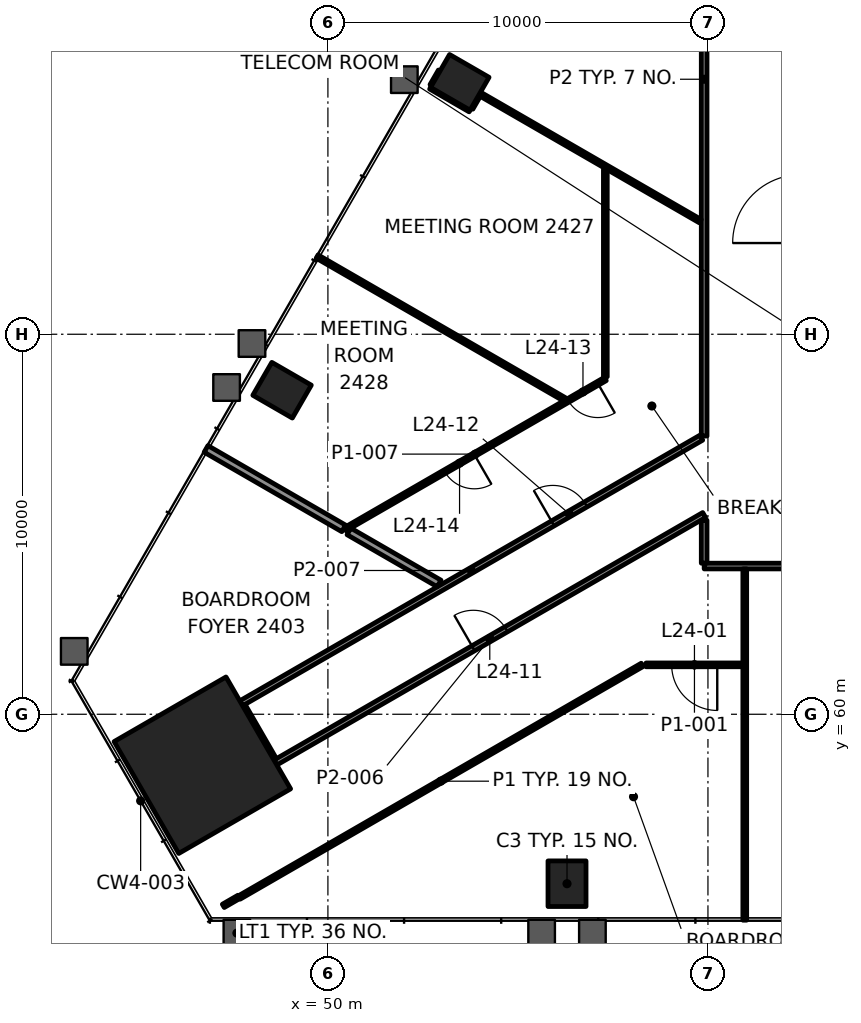
"""IFC4 building model, lengths in metres.
Left out: names, types, materials, properties, quantities, classifications, styles, units other than length and angle.
Written with IfcOpenShell. Run it as: python <this file> out.ifc"""

import sys

from ifc_helpers import new_model, si_unit, direction, frame, frame_2d, origin, origin_2d, place, context, subcontext, project, spatial, rectangle, extrude, element, fill, save


model = new_model("IFC4")
c1 = context("Model", 3, precision=1e-05, world=origin(), true_north=direction((0.0, 1.0)))
c2 = subcontext(c1, "Body", "Model", "MODEL_VIEW")
j1 = project(units=[si_unit("LENGTHUNIT", "METRE"), si_unit("PLANEANGLEUNIT", "RADIAN")], contexts=[c1])
p1 = place(None, origin())
s1 = spatial("IfcSite", under=j1, at=p1, CompositionType="ELEMENT")
p2 = place(p1, origin())
s2 = spatial("IfcBuilding", under=s1, at=p2, CompositionType="ELEMENT")
p3 = place(p2, frame((0.0, 0.0, 107.2)))
s3 = spatial("IfcBuildingStorey", under=s2, at=p3, CompositionType="ELEMENT", Elevation=107.2)
p4 = place(p3, frame((46.696, 58.659, 0.0), z_axis=(0.0, 0.0, 1.0), x_axis=(0.5, -0.866025403784, 0.0)))
e1 = element("IfcColumn", 1, at=p4, inside=s3, PredefinedType="COLUMN", context=c2, shape_type="SweptSolid", body=[
    extrude(rectangle(XDim=3.4, YDim=3.4, at=origin_2d()), origin(), (0.0, 0.0, 1.0), 4.2),
])
for number, where, z_axis, x_axis in (
    (2, (56.292, 55.541, -0.0), (0.0, 0.0, 1.0), (1.0, 0.0, 0.0)),
    (3, (53.471, 76.628, -0.0), (0.0, 0.0, 1.0), (-0.5, -0.866, 0.0)),
    (4, (48.794, 68.528, -0.0), (0.0, 0.0, 1.0), (-0.5, -0.866, 0.0)),
):
    element("IfcColumn", number, at=place(p3, frame(where, z_axis=z_axis, x_axis=x_axis)), inside=s3, PredefinedType="COLUMN", context=c2, shape_type="SweptSolid", body=[
        extrude(rectangle(XDim=1.0, YDim=1.2, at=origin_2d()), origin(), (0.0, 0.0, 1.0), 4.2),
    ])
p5 = place(p3, frame((60.919, 61.3, 0.0), z_axis=(0.0, 0.0, 1.0), x_axis=(-1.0, 0.0, 0.0)))
e5 = element("IfcWall", 5, at=p5, inside=s3, PredefinedType="PARTITIONING", context=c2, shape_type="SweptSolid", body=[
    extrude(rectangle(XDim=2.548, YDim=0.1, at=frame_2d((1.274, 0.0))), origin(), (0.0, 0.0, 1.0), 3.4),
])
p6 = place(p5, frame((0.674, 0.0, 0.0)))
e6 = element("IfcOpeningElement", 6, at=p6, cuts=e5, PredefinedType="OPENING", context=c2, shape_type="SweptSolid", body=[
    extrude(rectangle(XDim=1.2, YDim=2.1, at=frame_2d((0.6, 1.05))), frame((0.0, 0.06, 0.0), z_axis=(0.0, -1.0, 0.0), x_axis=(1.0, 0.0, 0.0)), (0.0, 0.0, 1.0), 0.12),
])
p7 = place(p3, frame((90.099, 63.9, 0.0), z_axis=(0.0, 0.0, 1.0), x_axis=(-1.0, 0.0, 0.0)))
e7 = element("IfcWall", 7, at=p7, inside=s3, PredefinedType="PARTITIONING", context=c2, shape_type="SweptSolid", body=[
    extrude(rectangle(XDim=30.199, YDim=0.15, at=frame_2d((15.099, 0.0))), origin(), (0.0, 0.0, 1.0), 3.4),
])
p8 = place(p7, frame((5.882, 0.0, 0.0)))
e8 = element("IfcOpeningElement", 8, at=p8, cuts=e7, PredefinedType="OPENING", context=c2, shape_type="SweptSolid", body=[
    extrude(rectangle(XDim=1.2, YDim=2.1, at=frame_2d((0.6, 1.05))), frame((0.0, 0.085, 0.0), z_axis=(0.0, -1.0, 0.0), x_axis=(1.0, 0.0, 0.0)), (0.0, 0.0, 1.0), 0.17),
])
p9 = place(p7, frame((20.346, 0.0, 0.0)))
e9 = element("IfcOpeningElement", 9, at=p9, cuts=e7, PredefinedType="OPENING", context=c2, shape_type="SweptSolid", body=[
    extrude(rectangle(XDim=1.2, YDim=2.1, at=frame_2d((0.6, 1.05))), frame((0.0, 0.085, 0.0), z_axis=(0.0, -1.0, 0.0), x_axis=(1.0, 0.0, 0.0)), (0.0, 0.0, 1.0), 0.17),
])
p10 = place(p3, frame((47.667, 55.178, 0.0), z_axis=(0.0, 0.0, 1.0), x_axis=(0.866022223021, 0.500005509203, 0.0)))
e10 = element("IfcWall", 10, at=p10, inside=s3, PredefinedType="PARTITIONING", context=c2, shape_type="SweptSolid", body=[
    extrude(rectangle(XDim=12.244, YDim=0.1, at=frame_2d((6.122, 0.0))), origin(), (0.0, 0.0, 1.0), 3.4),
])
p11 = place(p3, frame((47.248, 54.958, 0.0), z_axis=(0.0, 0.0, 1.0), x_axis=(0.865944638795, 0.50013986298, 0.0)))
e11 = element("IfcWall", 11, at=p11, inside=s3, PredefinedType="PARTITIONING", context=c2, shape_type="SweptSolid", body=[
    extrude(rectangle(XDim=0.472, YDim=0.1, at=frame_2d((0.236, 0.0))), origin(), (0.0, 0.0, 1.0), 3.4),
])
p12 = place(p3, frame((48.619, 58.73, 0.0), z_axis=(0.0, 0.0, 1.0), x_axis=(0.866022351388, 0.500005286868, 0.0)))
e12 = element("IfcWall", 12, at=p12, inside=s3, PredefinedType="PARTITIONING", context=c2, shape_type="SweptSolid", body=[
    extrude(rectangle(XDim=13.026, YDim=0.15, at=frame_2d((6.513, 0.0))), origin(), (0.0, 0.0, 1.0), 3.247),
])
p13 = place(p12, frame((6.013, 0.0, 0.0)))
e13 = element("IfcOpeningElement", 13, at=p13, cuts=e12, PredefinedType="OPENING", context=c2, shape_type="SweptSolid", body=[
    extrude(rectangle(XDim=1.0, YDim=2.1, at=frame_2d((0.5, 1.05))), frame((0.0, 0.085, 0.0), z_axis=(0.0, -1.0, 0.0), x_axis=(1.0, 0.0, 0.0)), (0.0, 0.0, 1.0), 0.17),
])
p14 = place(p3, frame((47.719, 60.289, 0.0), z_axis=(0.0, 0.0, 1.0), x_axis=(0.866025916507, 0.499999111938, 0.0)))
e14 = element("IfcWall", 14, at=p14, inside=s3, PredefinedType="PARTITIONING", context=c2, shape_type="SweptSolid", body=[
    extrude(rectangle(XDim=13.979, YDim=0.15, at=frame_2d((6.99, 0.0))), origin(), (0.0, 0.0, 1.0), 3.4),
])
p15 = place(p14, frame((9.467, 0.0, 0.0)))
e15 = element("IfcOpeningElement", 15, at=p15, cuts=e14, PredefinedType="OPENING", context=c2, shape_type="SweptSolid", body=[
    extrude(rectangle(XDim=1.0, YDim=2.1, at=frame_2d((0.5, 1.05))), frame((0.0, 0.085, 0.0), z_axis=(0.0, -1.0, 0.0), x_axis=(1.0, 0.0, 0.0)), (0.0, 0.0, 1.0), 0.17),
])
p16 = place(p3, frame((57.3, 68.823, 0.0), z_axis=(0.0, 0.0, 1.0), x_axis=(-0.866030292833, -0.499991531824, 0.0)))
e16 = element("IfcWall", 16, at=p16, inside=s3, PredefinedType="PARTITIONING", context=c2, shape_type="SweptSolid", body=[
    extrude(rectangle(XDim=7.906, YDim=0.1, at=frame_2d((3.953, 0.0))), origin(), (0.0, 0.0, 1.0), 3.4),
])
p17 = place(p16, frame((0.229, 0.0, 0.0)))
e17 = element("IfcOpeningElement", 17, at=p17, cuts=e16, PredefinedType="OPENING", context=c2, shape_type="SweptSolid", body=[
    extrude(rectangle(XDim=0.9, YDim=2.1, at=frame_2d((0.45, 1.05))), frame((0.0, 0.06, 0.0), z_axis=(0.0, -1.0, 0.0), x_axis=(1.0, 0.0, 0.0)), (0.0, 0.0, 1.0), 0.12),
])
p18 = place(p16, frame((3.979, 0.0, 0.0)))
e18 = element("IfcOpeningElement", 18, at=p18, cuts=e16, PredefinedType="OPENING", context=c2, shape_type="SweptSolid", body=[
    extrude(rectangle(XDim=0.9, YDim=2.1, at=frame_2d((0.45, 1.05))), frame((0.0, 0.06, 0.0), z_axis=(0.0, -1.0, 0.0), x_axis=(1.0, 0.0, 0.0)), (0.0, 0.0, 1.0), 0.12),
])
p19 = place(p3, frame((53.771, 75.948, 0.0), z_axis=(0.0, 0.0, 1.0), x_axis=(0.500246304613, 0.865883153041, 0.0)))
e19 = element("IfcWall", 19, at=p19, inside=s3, PredefinedType="PARTITIONING", context=c2, shape_type="SweptSolid", body=[
    extrude(rectangle(XDim=0.39, YDim=0.1, at=frame_2d((0.195, 0.0))), origin(), (0.0, 0.0, 1.0), 3.4),
])
p20 = place(p3, frame((52.73, 76.545, 0.0), z_axis=(0.0, 0.0, 1.0), x_axis=(0.49999285859, 0.86602952684, 0.0)))
e20 = element("IfcWall", 20, at=p20, inside=s3, PredefinedType="PARTITIONING", context=c2, shape_type="SweptSolid", body=[
    extrude(rectangle(XDim=0.443, YDim=0.1, at=frame_2d((0.221, 0.0))), origin(), (0.0, 0.0, 1.0), 3.4),
])
p21 = place(p3, frame((60.969, 54.581, 0.0), z_axis=(0.0, 0.0, 1.0), x_axis=(0.0, 1.0, 0.0)))
e21 = element("IfcWall", 21, at=p21, inside=s3, PredefinedType="PARTITIONING", context=c2, shape_type="SweptSolid", body=[
    extrude(rectangle(XDim=9.244, YDim=0.1, at=frame_2d((4.622, 0.0))), origin(), (0.0, 0.0, 1.0), 3.165),
])
p22 = place(p3, frame((59.9, 63.976, 0.0), z_axis=(0.0, 0.0, 1.0), x_axis=(0.0, 1.0, 0.0)))
e22 = element("IfcWall", 22, at=p22, inside=s3, PredefinedType="PARTITIONING", context=c2, shape_type="SweptSolid", body=[
    extrude(rectangle(XDim=1.131, YDim=0.15, at=frame_2d((0.565, 0.0))), origin(), (0.0, 0.0, 1.0), 3.247),
])
p23 = place(p3, frame((59.9, 67.321, 0.0), z_axis=(0.0, 0.0, 1.0), x_axis=(0.0, 1.0, 0.0)))
e23 = element("IfcWall", 23, at=p23, inside=s3, PredefinedType="PARTITIONING", context=c2, shape_type="SweptSolid", body=[
    extrude(rectangle(XDim=18.778, YDim=0.15, at=frame_2d((9.389, 0.0))), origin(), (0.0, 0.0, 1.0), 3.4),
])
p24 = place(p3, frame((57.3, 68.88, 0.0), z_axis=(0.0, 0.0, 1.0), x_axis=(0.0, 1.0, 0.0)))
e24 = element("IfcWall", 24, at=p24, inside=s3, PredefinedType="PARTITIONING", context=c2, shape_type="SweptSolid", body=[
    extrude(rectangle(XDim=5.45, YDim=0.1, at=frame_2d((2.725, 0.0))), origin(), (0.0, 0.0, 1.0), 3.4),
])
p25 = place(p3, frame((48.58, 58.794, 0.0), z_axis=(0.0, 0.0, 1.0), x_axis=(-0.499944585209, 0.866057395165, 0.0)))
e25 = element("IfcWall", 25, at=p25, inside=s3, PredefinedType="PARTITIONING", context=c2, shape_type="SweptSolid", body=[
    extrude(rectangle(XDim=1.649, YDim=0.15, at=frame_2d((0.825, 0.0))), origin(), (0.0, 0.0, 1.0), 3.247),
])
p26 = place(p3, frame((59.799, 72.975, 0.0), z_axis=(0.0, 0.0, 1.0), x_axis=(-0.866037071789, 0.499979789879, 0.0)))
e26 = element("IfcWall", 26, at=p26, inside=s3, PredefinedType="PARTITIONING", context=c2, shape_type="SweptSolid", body=[
    extrude(rectangle(XDim=6.707, YDim=0.1, at=frame_2d((3.354, 0.0))), origin(), (0.0, 0.0, 1.0), 3.4),
])
p27 = place(p3, frame((53.741, 75.896, 0.0), z_axis=(0.0, 0.0, 1.0), x_axis=(-0.866094119867, 0.499880961361, 0.0)))
e27 = element("IfcWall", 27, at=p27, inside=s3, PredefinedType="PARTITIONING", context=c2, shape_type="SweptSolid", body=[
    extrude(rectangle(XDim=1.2, YDim=0.1, at=frame_2d((0.6, 0.0))), origin(), (0.0, 0.0, 1.0), 3.165),
])
p28 = place(p3, frame((56.223, 68.288, 0.0), z_axis=(0.0, 0.0, 1.0), x_axis=(-0.866018922649, 0.500011225488, 0.0)))
e28 = element("IfcWall", 28, at=p28, inside=s3, PredefinedType="PARTITIONING", context=c2, shape_type="SweptSolid", body=[
    extrude(rectangle(XDim=7.513, YDim=0.1, at=frame_2d((3.757, 0.0))), origin(), (0.0, 0.0, 1.0), 3.165),
])
p29 = place(p3, frame((52.926, 63.441, 0.0), z_axis=(0.0, 0.0, 1.0), x_axis=(-0.866019409031, 0.500010383074, 0.0)))
e29 = element("IfcWall", 29, at=p29, inside=s3, PredefinedType="PARTITIONING", context=c2, shape_type="SweptSolid", body=[
    extrude(rectangle(XDim=2.74, YDim=0.2, at=frame_2d((1.37, 0.0))), origin(), (0.0, 0.0, 1.0), 3.4),
])
p30 = place(p3, frame((50.416, 64.891, 0.0), z_axis=(0.0, 0.0, 1.0), x_axis=(-0.866054366634, 0.499949831517, 0.0)))
e30 = element("IfcWall", 30, at=p30, inside=s3, PredefinedType="PARTITIONING", context=c2, shape_type="SweptSolid", body=[
    extrude(rectangle(XDim=4.183, YDim=0.2, at=frame_2d((2.091, 0.0))), origin(), (0.0, 0.0, 1.0), 3.4),
])
p31 = place(p6, origin())
e31 = element("IfcDoor", 31, at=p31, inside=s3, OperationType="DOUBLE_DOOR_SINGLE_SWING", PredefinedType="DOOR", context=c2, shape_type="SweptSolid", body=[
    extrude(rectangle(XDim=1.2, YDim=2.1, at=frame_2d((0.6, 1.05))), frame((0.0, 0.025, 0.0), z_axis=(0.0, -1.0, 0.0), x_axis=(1.0, 0.0, 0.0)), (0.0, 0.0, 1.0), 0.05),
])
fill(e6, e31)
p32 = place(p13, origin())
e32 = element("IfcDoor", 32, at=p32, inside=s3, OperationType="SINGLE_SWING_RIGHT", PredefinedType="DOOR", context=c2, shape_type="SweptSolid", body=[
    extrude(rectangle(XDim=1.0, YDim=2.1, at=frame_2d((0.5, 1.05))), frame((0.0, 0.025, 0.0), z_axis=(0.0, -1.0, 0.0), x_axis=(1.0, 0.0, 0.0)), (0.0, 0.0, 1.0), 0.05),
])
fill(e13, e32)
p33 = place(p15, origin())
e33 = element("IfcDoor", 33, at=p33, inside=s3, OperationType="SINGLE_SWING_LEFT", PredefinedType="DOOR", context=c2, shape_type="SweptSolid", body=[
    extrude(rectangle(XDim=1.0, YDim=2.1, at=frame_2d((0.5, 1.05))), frame((0.0, 0.025, 0.0), z_axis=(0.0, -1.0, 0.0), x_axis=(1.0, 0.0, 0.0)), (0.0, 0.0, 1.0), 0.05),
])
fill(e15, e33)
p34 = place(p17, origin())
e34 = element("IfcDoor", 34, at=p34, inside=s3, OperationType="SINGLE_SWING_LEFT", PredefinedType="DOOR", context=c2, shape_type="SweptSolid", body=[
    extrude(rectangle(XDim=0.9, YDim=2.1, at=frame_2d((0.45, 1.05))), frame((0.0, 0.025, 0.0), z_axis=(0.0, -1.0, 0.0), x_axis=(1.0, 0.0, 0.0)), (0.0, 0.0, 1.0), 0.05),
])
fill(e17, e34)
p35 = place(p18, origin())
e35 = element("IfcDoor", 35, at=p35, inside=s3, OperationType="SINGLE_SWING_RIGHT", PredefinedType="DOOR", context=c2, shape_type="SweptSolid", body=[
    extrude(rectangle(XDim=0.9, YDim=2.1, at=frame_2d((0.45, 1.05))), frame((0.0, 0.025, 0.0), z_axis=(0.0, -1.0, 0.0), x_axis=(1.0, 0.0, 0.0)), (0.0, 0.0, 1.0), 0.05),
])
fill(e18, e35)
save(model, sys.argv[1])
